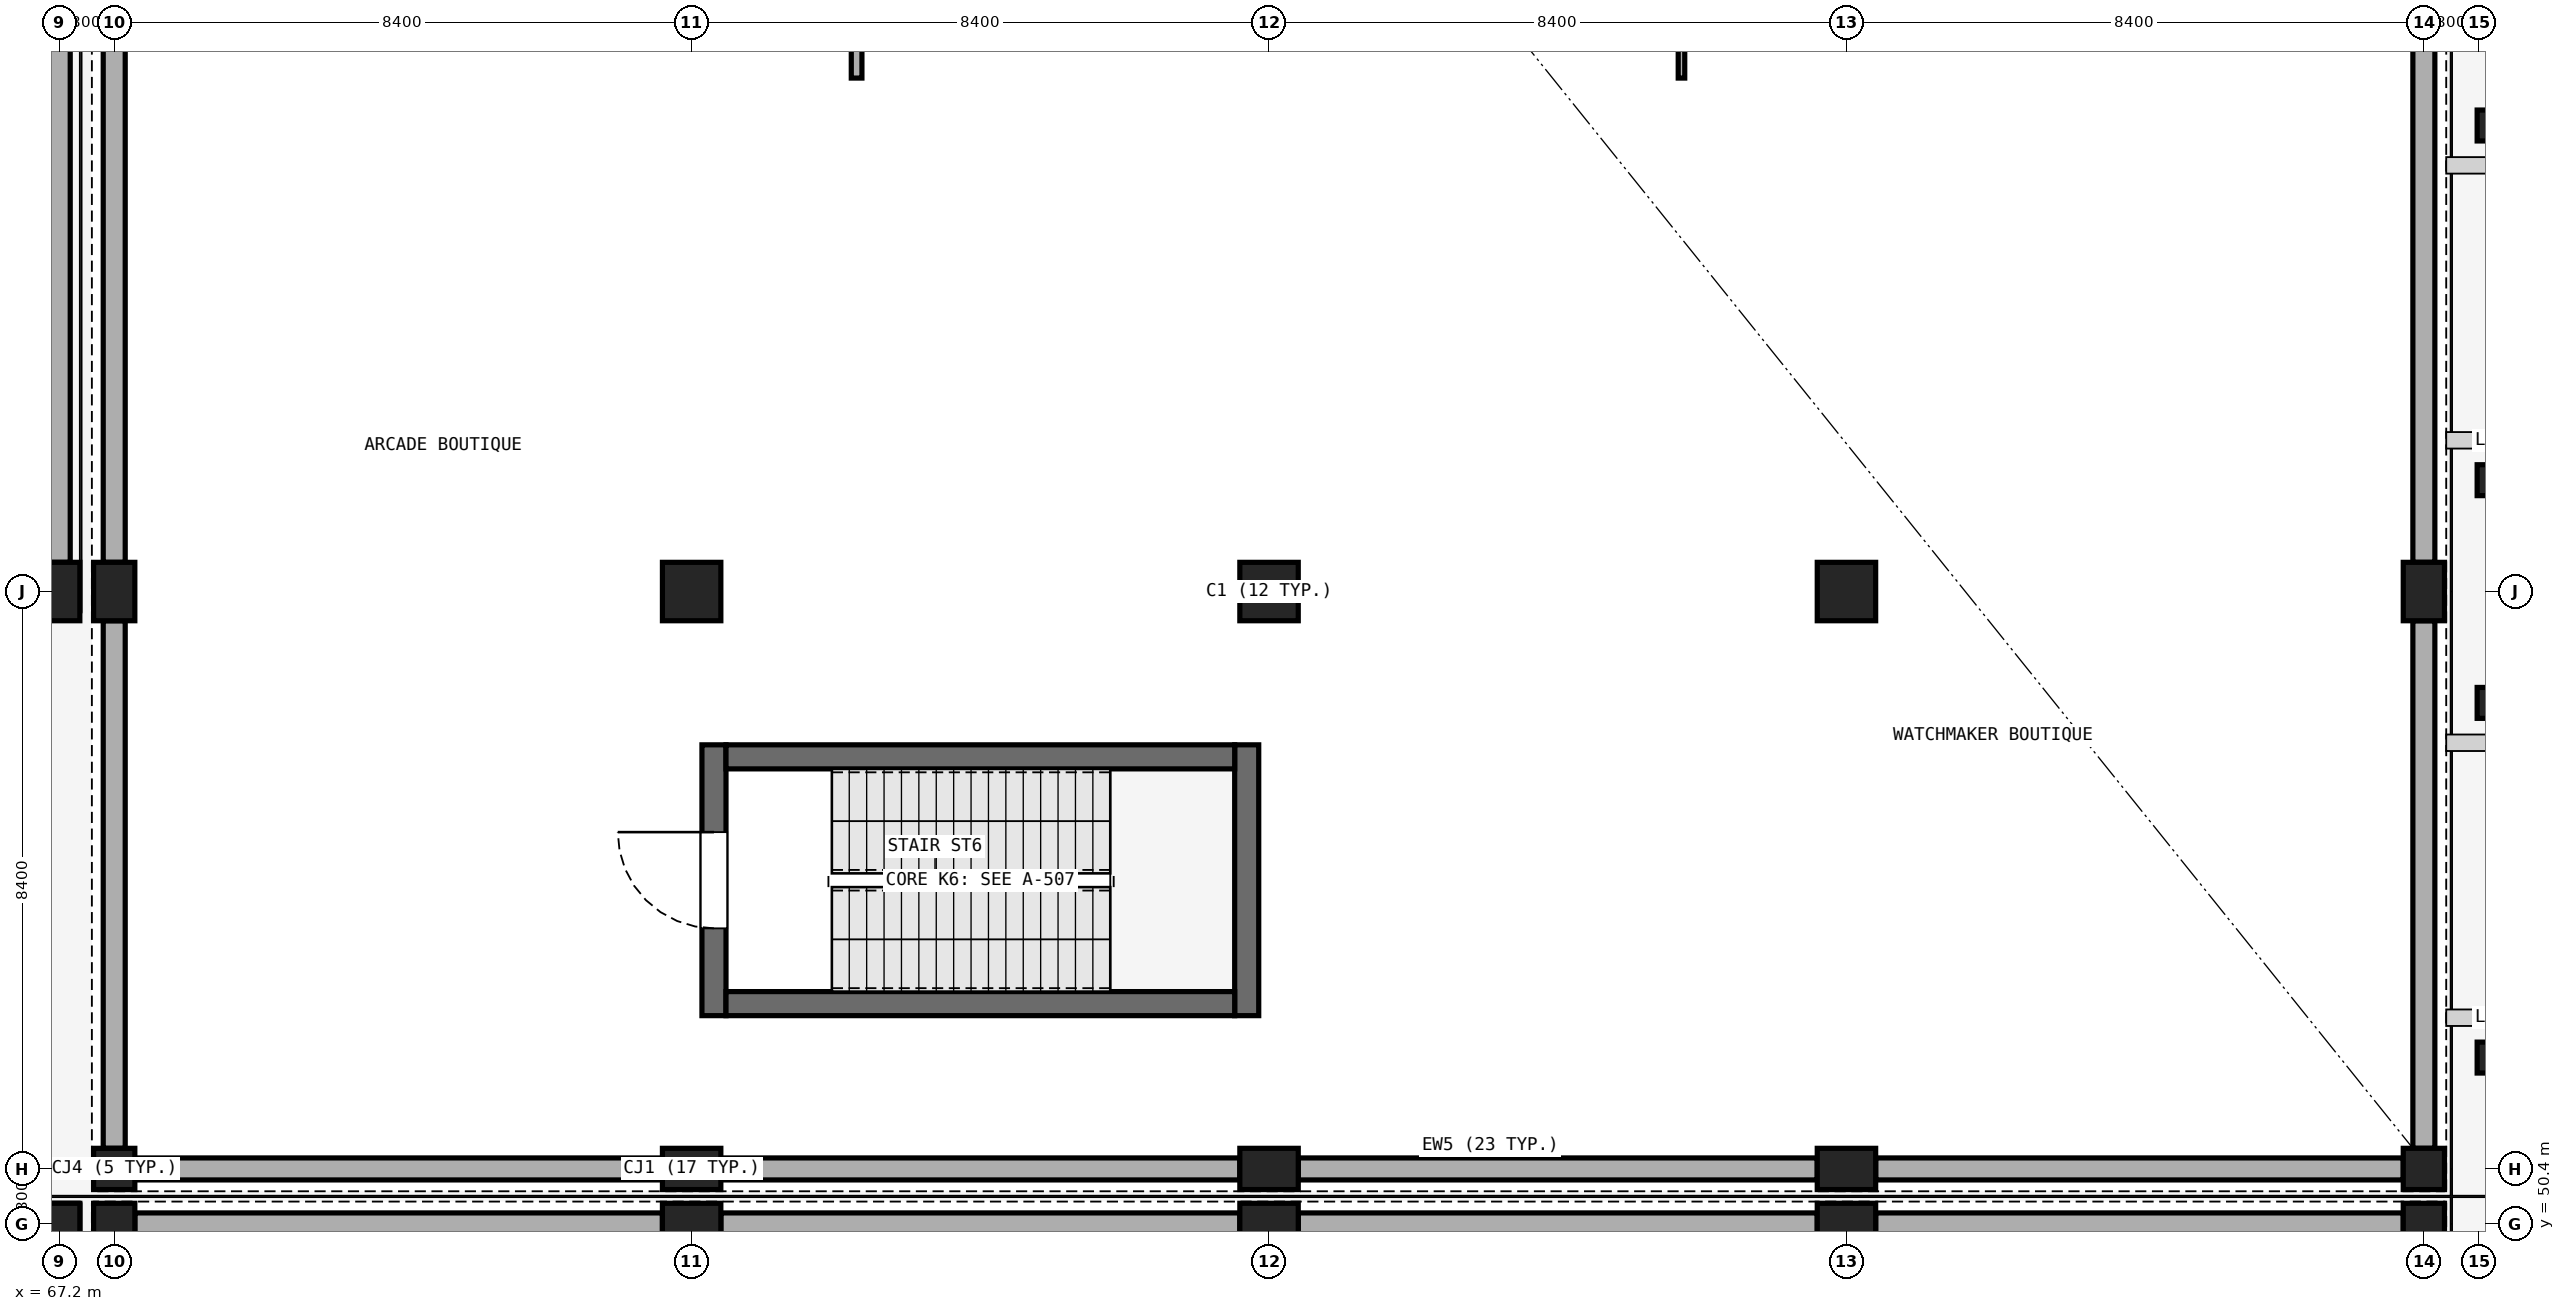
"""IFC4 building model, lengths in metres.
Left out: names, types, materials, properties, quantities, classifications, styles, units other than length and angle.
Written with IfcOpenShell. Run it as: python <this file> out.ifc"""

import sys

from ifc_helpers import new_model, si_unit, direction, frame, frame_2d, origin, origin_2d, place, context, subcontext, project, spatial, rectangle, extrude, element, fill, save


model = new_model("IFC4")
c1 = context("Model", 3, precision=1e-05, world=origin(), true_north=direction((0.0, 1.0)))
c2 = subcontext(c1, "Body", "Model", "MODEL_VIEW")
j1 = project(units=[si_unit("LENGTHUNIT", "METRE"), si_unit("PLANEANGLEUNIT", "RADIAN")], contexts=[c1])
p1 = place(None, origin())
s1 = spatial("IfcSite", under=j1, at=p1, CompositionType="ELEMENT")
p2 = place(p1, origin())
s2 = spatial("IfcBuilding", under=s1, at=p2, CompositionType="ELEMENT")
p3 = place(p2, origin())
s3 = spatial("IfcBuildingStorey", under=s2, at=p3, CompositionType="ELEMENT", Elevation=0.0)
p4 = place(p3, frame((67.2, 59.6, 0.0), z_axis=(0.0, 0.0, 1.0), x_axis=(1.0, 0.0, 0.0)))
e1 = element("IfcColumn", 1, at=p4, inside=s3, PredefinedType="COLUMN", context=c2, shape_type="SweptSolid", body=[
    extrude(rectangle(XDim=0.6, YDim=0.85, at=origin_2d()), origin(), (0.0, 0.0, 1.0), 5.4),
])
p5 = place(p3, frame((68.0, 50.4, 0.0), z_axis=(0.0, 0.0, 1.0), x_axis=(1.0, 0.0, 0.0)))
e2 = element("IfcColumn", 2, at=p5, inside=s3, PredefinedType="COLUMN", context=c2, shape_type="SweptSolid", body=[
    extrude(rectangle(XDim=0.6, YDim=0.6, at=origin_2d()), origin(), (0.0, 0.0, 1.0), 5.4),
])
for number, where, z_axis, x_axis in (
    (3, (76.4, 50.4, 0.0), (0.0, 0.0, 1.0), (0.0, 1.0, 0.0)),
    (4, (84.8, 50.4, 0.0), (0.0, 0.0, 1.0), (0.0, 1.0, 0.0)),
    (5, (93.2, 50.4, 0.0), (0.0, 0.0, 1.0), (0.0, 1.0, 0.0)),
):
    element("IfcColumn", number, at=place(p3, frame(where, z_axis=z_axis, x_axis=x_axis)), inside=s3, PredefinedType="COLUMN", context=c2, shape_type="SweptSolid", body=[
        extrude(rectangle(XDim=0.6, YDim=0.85, at=origin_2d()), origin(), (0.0, 0.0, 1.0), 5.4),
    ])
for number, where, z_axis, x_axis in (
    (6, (101.6, 50.4, 0.0), (0.0, 0.0, 1.0), (1.0, 0.0, 0.0)),
    (7, (68.0, 51.2, 0.0), (0.0, 0.0, 1.0), (1.0, 0.0, 0.0)),
):
    element("IfcColumn", number, at=place(p3, frame(where, z_axis=z_axis, x_axis=x_axis)), inside=s3, PredefinedType="COLUMN", context=c2, shape_type="SweptSolid", body=[
        extrude(rectangle(XDim=0.6, YDim=0.6, at=origin_2d()), origin(), (0.0, 0.0, 1.0), 5.4),
    ])
for number, where, z_axis, x_axis in (
    (8, (76.4, 51.2, 0.0), (0.0, 0.0, 1.0), (0.0, 1.0, 0.0)),
    (9, (84.8, 51.2, 0.0), (0.0, 0.0, 1.0), (0.0, 1.0, 0.0)),
    (10, (93.2, 51.2, 0.0), (0.0, 0.0, 1.0), (0.0, 1.0, 0.0)),
):
    element("IfcColumn", number, at=place(p3, frame(where, z_axis=z_axis, x_axis=x_axis)), inside=s3, PredefinedType="COLUMN", context=c2, shape_type="SweptSolid", body=[
        extrude(rectangle(XDim=0.6, YDim=0.85, at=origin_2d()), origin(), (0.0, 0.0, 1.0), 5.4),
    ])
p6 = place(p3, frame((101.6, 51.2, 0.0), z_axis=(0.0, 0.0, 1.0), x_axis=(1.0, 0.0, 0.0)))
e11 = element("IfcColumn", 11, at=p6, inside=s3, PredefinedType="COLUMN", context=c2, shape_type="SweptSolid", body=[
    extrude(rectangle(XDim=0.6, YDim=0.6, at=origin_2d()), origin(), (0.0, 0.0, 1.0), 5.4),
])
p7 = place(p3, frame((68.0, 59.6, 0.0), z_axis=(0.0, 0.0, 1.0), x_axis=(1.0, 0.0, 0.0)))
e12 = element("IfcColumn", 12, at=p7, inside=s3, PredefinedType="COLUMN", context=c2, shape_type="SweptSolid", body=[
    extrude(rectangle(XDim=0.6, YDim=0.85, at=origin_2d()), origin(), (0.0, 0.0, 1.0), 5.4),
])
for number, where, z_axis, x_axis in (
    (13, (76.4, 59.6, 0.0), (0.0, 0.0, 1.0), (1.0, 0.0, 0.0)),
    (14, (84.8, 59.6, 0.0), (0.0, 0.0, 1.0), (1.0, 0.0, 0.0)),
    (15, (93.2, 59.6, 0.0), (0.0, 0.0, 1.0), (1.0, 0.0, 0.0)),
):
    element("IfcColumn", number, at=place(p3, frame(where, z_axis=z_axis, x_axis=x_axis)), inside=s3, PredefinedType="COLUMN", context=c2, shape_type="SweptSolid", body=[
        extrude(rectangle(XDim=0.85, YDim=0.85, at=origin_2d()), origin(), (0.0, 0.0, 1.0), 5.4),
    ])
p8 = place(p3, frame((101.6, 59.6, 0.0), z_axis=(0.0, 0.0, 1.0), x_axis=(1.0, 0.0, 0.0)))
e16 = element("IfcColumn", 16, at=p8, inside=s3, PredefinedType="COLUMN", context=c2, shape_type="SweptSolid", body=[
    extrude(rectangle(XDim=0.6, YDim=0.85, at=origin_2d()), origin(), (0.0, 0.0, 1.0), 5.4),
])
p9 = place(p3, frame((67.2, 50.4, 0.0), z_axis=(0.0, 0.0, 1.0), x_axis=(1.0, 0.0, 0.0)))
e17 = element("IfcColumn", 17, at=p9, inside=s3, PredefinedType="COLUMN", context=c2, shape_type="SweptSolid", body=[
    extrude(rectangle(XDim=0.6, YDim=0.6, at=origin_2d()), origin(), (0.0, 0.0, 1.0), 5.4),
])
for number, where, z_axis, x_axis in (
    (18, (102.65, 52.82, 0.0), (0.0, 0.0, 1.0), (0.0, 1.0, 0.0)),
    (19, (102.65, 57.98, 0.0), (0.0, 0.0, 1.0), (0.0, 1.0, 0.0)),
    (20, (102.65, 61.22, 0.0), (0.0, 0.0, 1.0), (0.0, 1.0, 0.0)),
    (21, (102.65, 66.38, 0.0), (0.0, 0.0, 1.0), (0.0, 1.0, 0.0)),
):
    element("IfcColumn", number, at=place(p3, frame(where, z_axis=z_axis, x_axis=x_axis)), inside=s3, PredefinedType="PILASTER", context=c2, shape_type="SweptSolid", body=[
        extrude(rectangle(XDim=0.45, YDim=0.55, at=origin_2d()), origin(), (0.0, 0.0, 1.0), 5.4),
    ])
p10 = place(p3, frame((67.2, 60.025, 0.0), z_axis=(0.0, 0.0, 1.0), x_axis=(0.0, 1.0, 0.0)))
e22 = element("IfcWall", 22, at=p10, inside=s3, PredefinedType="SOLIDWALL", context=c2, shape_type="SweptSolid", body=[
    extrude(rectangle(XDim=7.55, YDim=0.32, at=frame_2d((3.775, 0.0))), origin(), (0.0, 0.0, 1.0), 4.35),
])
p11 = place(p3, frame((68.3, 50.4, 0.0), z_axis=(0.0, 0.0, 1.0), x_axis=(1.0, 0.0, 0.0)))
e23 = element("IfcWall", 23, at=p11, inside=s3, PredefinedType="SOLIDWALL", context=c2, shape_type="SweptSolid", body=[
    extrude(rectangle(XDim=7.675, YDim=0.32, at=frame_2d((3.837, 0.0))), origin(), (0.0, 0.0, 1.0), 4.35),
])
p12 = place(p3, frame((76.825, 50.4, 0.0), z_axis=(0.0, 0.0, 1.0), x_axis=(1.0, 0.0, 0.0)))
e24 = element("IfcWall", 24, at=p12, inside=s3, PredefinedType="SOLIDWALL", context=c2, shape_type="SweptSolid", body=[
    extrude(rectangle(XDim=7.55, YDim=0.32, at=frame_2d((3.775, 0.0))), origin(), (0.0, 0.0, 1.0), 4.35),
])
p13 = place(p3, frame((85.225, 50.4, 0.0), z_axis=(0.0, 0.0, 1.0), x_axis=(1.0, 0.0, 0.0)))
e25 = element("IfcWall", 25, at=p13, inside=s3, PredefinedType="SOLIDWALL", context=c2, shape_type="SweptSolid", body=[
    extrude(rectangle(XDim=7.55, YDim=0.32, at=frame_2d((3.775, 0.0))), origin(), (0.0, 0.0, 1.0), 4.35),
])
for number, where, z_axis, x_axis in (
    (26, (93.625, 50.4, 0.0), (0.0, 0.0, 1.0), (1.0, 0.0, 0.0)),
    (27, (68.3, 51.2, 0.0), (0.0, 0.0, 1.0), (1.0, 0.0, 0.0)),
):
    element("IfcWall", number, at=place(p3, frame(where, z_axis=z_axis, x_axis=x_axis)), inside=s3, PredefinedType="SOLIDWALL", context=c2, shape_type="SweptSolid", body=[
        extrude(rectangle(XDim=7.675, YDim=0.32, at=frame_2d((3.837, 0.0))), origin(), (0.0, 0.0, 1.0), 4.35),
    ])
p14 = place(p3, frame((76.825, 51.2, 0.0), z_axis=(0.0, 0.0, 1.0), x_axis=(1.0, 0.0, 0.0)))
e28 = element("IfcWall", 28, at=p14, inside=s3, PredefinedType="SOLIDWALL", context=c2, shape_type="SweptSolid", body=[
    extrude(rectangle(XDim=7.55, YDim=0.32, at=frame_2d((3.775, 0.0))), origin(), (0.0, 0.0, 1.0), 4.35),
])
p15 = place(p3, frame((85.225, 51.2, 0.0), z_axis=(0.0, 0.0, 1.0), x_axis=(1.0, 0.0, 0.0)))
e29 = element("IfcWall", 29, at=p15, inside=s3, PredefinedType="SOLIDWALL", context=c2, shape_type="SweptSolid", body=[
    extrude(rectangle(XDim=7.55, YDim=0.32, at=frame_2d((3.775, 0.0))), origin(), (0.0, 0.0, 1.0), 4.35),
])
for number, where, z_axis, x_axis in (
    (30, (93.625, 51.2, 0.0), (0.0, 0.0, 1.0), (1.0, 0.0, 0.0)),
    (31, (68.0, 51.5, 0.0), (0.0, 0.0, 1.0), (0.0, 1.0, 0.0)),
):
    element("IfcWall", number, at=place(p3, frame(where, z_axis=z_axis, x_axis=x_axis)), inside=s3, PredefinedType="SOLIDWALL", context=c2, shape_type="SweptSolid", body=[
        extrude(rectangle(XDim=7.675, YDim=0.32, at=frame_2d((3.837, 0.0))), origin(), (0.0, 0.0, 1.0), 4.35),
    ])
p16 = place(p3, frame((68.0, 60.025, 0.0), z_axis=(0.0, 0.0, 1.0), x_axis=(0.0, 1.0, 0.0)))
e32 = element("IfcWall", 32, at=p16, inside=s3, PredefinedType="SOLIDWALL", context=c2, shape_type="SweptSolid", body=[
    extrude(rectangle(XDim=7.55, YDim=0.32, at=frame_2d((3.775, 0.0))), origin(), (0.0, 0.0, 1.0), 4.35),
])
p17 = place(p3, frame((101.6, 51.5, 0.0), z_axis=(0.0, 0.0, 1.0), x_axis=(0.0, 1.0, 0.0)))
e33 = element("IfcWall", 33, at=p17, inside=s3, PredefinedType="SOLIDWALL", context=c2, shape_type="SweptSolid", body=[
    extrude(rectangle(XDim=7.675, YDim=0.32, at=frame_2d((3.837, 0.0))), origin(), (0.0, 0.0, 1.0), 4.35),
])
p18 = place(p3, frame((101.6, 60.025, 0.0), z_axis=(0.0, 0.0, 1.0), x_axis=(0.0, 1.0, 0.0)))
e34 = element("IfcWall", 34, at=p18, inside=s3, PredefinedType="SOLIDWALL", context=c2, shape_type="SweptSolid", body=[
    extrude(rectangle(XDim=7.55, YDim=0.32, at=frame_2d((3.775, 0.0))), origin(), (0.0, 0.0, 1.0), 4.35),
])
p19 = place(p3, frame((76.725, 53.43, 0.0), z_axis=(0.0, 0.0, 1.0), x_axis=(0.0, 1.0, 0.0)))
e35 = element("IfcWall", 35, at=p19, inside=s3, PredefinedType="SHEAR", context=c2, shape_type="SweptSolid", body=[
    extrude(rectangle(XDim=3.94, YDim=0.35, at=frame_2d((1.97, 0.0))), origin(), (0.0, 0.0, 1.0), 5.1),
])
p20 = place(p19, frame((1.27, 0.0, 0.0)))
e36 = element("IfcOpeningElement", 36, at=p20, cuts=e35, PredefinedType="OPENING", context=c2, shape_type="SweptSolid", body=[
    extrude(rectangle(XDim=1.4, YDim=2.15, at=frame_2d((0.7, 1.075))), frame((0.0, 0.185, 0.0), z_axis=(0.0, -1.0, 0.0), x_axis=(1.0, 0.0, 0.0)), (0.0, 0.0, 1.0), 0.37),
])
p21 = place(p3, frame((84.475, 53.43, 0.0), z_axis=(0.0, 0.0, 1.0), x_axis=(0.0, 1.0, 0.0)))
e37 = element("IfcWall", 37, at=p21, inside=s3, PredefinedType="SHEAR", context=c2, shape_type="SweptSolid", body=[
    extrude(rectangle(XDim=3.94, YDim=0.35, at=frame_2d((1.97, 0.0))), origin(), (0.0, 0.0, 1.0), 5.1),
])
for number, where, z_axis, x_axis in (
    (38, (76.9, 53.605, 0.0), (0.0, 0.0, 1.0), (1.0, 0.0, 0.0)),
    (39, (76.9, 57.195, 0.0), (0.0, 0.0, 1.0), (1.0, 0.0, 0.0)),
):
    element("IfcWall", number, at=place(p3, frame(where, z_axis=z_axis, x_axis=x_axis)), inside=s3, PredefinedType="SHEAR", context=c2, shape_type="SweptSolid", body=[
        extrude(rectangle(XDim=7.4, YDim=0.35, at=frame_2d((3.7, 0.0))), origin(), (0.0, 0.0, 1.0), 5.1),
    ])
p22 = place(p3, frame((78.8, 67.07, 0.0), z_axis=(0.0, 0.0, 1.0), x_axis=(0.0, 1.0, 0.0)))
e40 = element("IfcWall", 40, at=p22, inside=s3, PredefinedType="PARTITIONING", context=c2, shape_type="SweptSolid", body=[
    extrude(rectangle(XDim=11.66, YDim=0.155, at=frame_2d((5.83, 0.0))), origin(), (0.0, 0.0, 1.0), 4.35),
])
p23 = place(p22, frame((5.35, 0.0, 0.0)))
e41 = element("IfcOpeningElement", 41, at=p23, cuts=e40, PredefinedType="OPENING", context=c2, shape_type="SweptSolid", body=[
    extrude(rectangle(XDim=0.96, YDim=2.34, at=frame_2d((0.48, 1.17))), frame((0.0, 0.087, 0.0), z_axis=(0.0, -1.0, 0.0), x_axis=(1.0, 0.0, 0.0)), (0.0, 0.0, 1.0), 0.175),
])
p24 = place(p3, frame((90.8, 67.07, 0.0), z_axis=(0.0, 0.0, 1.0), x_axis=(0.0, 1.0, 0.0)))
e42 = element("IfcWall", 42, at=p24, inside=s3, PredefinedType="PARTITIONING", context=c2, shape_type="SweptSolid", body=[
    extrude(rectangle(XDim=11.66, YDim=0.095, at=frame_2d((5.83, 0.0))), origin(), (0.0, 0.0, 1.0), 4.35),
])
p25 = place(p24, frame((5.31, 0.0, 0.0)))
e43 = element("IfcOpeningElement", 43, at=p25, cuts=e42, PredefinedType="OPENING", context=c2, shape_type="SweptSolid", body=[
    extrude(rectangle(XDim=1.04, YDim=2.22, at=frame_2d((0.52, 1.11))), frame((0.0, 0.057, 0.0), z_axis=(0.0, -1.0, 0.0), x_axis=(1.0, 0.0, 0.0)), (0.0, 0.0, 1.0), 0.115),
])
p26 = place(p20, origin())
e44 = element("IfcDoor", 44, at=p26, inside=s3, OperationType="SINGLE_SWING_RIGHT", PredefinedType="DOOR", context=c2, shape_type="SweptSolid", body=[
    extrude(rectangle(XDim=1.4, YDim=2.15, at=frame_2d((0.7, 1.075))), frame((0.0, 0.025, 0.0), z_axis=(0.0, -1.0, 0.0), x_axis=(1.0, 0.0, 0.0)), (0.0, 0.0, 1.0), 0.05),
])
fill(e36, e44)
save(model, sys.argv[1])
